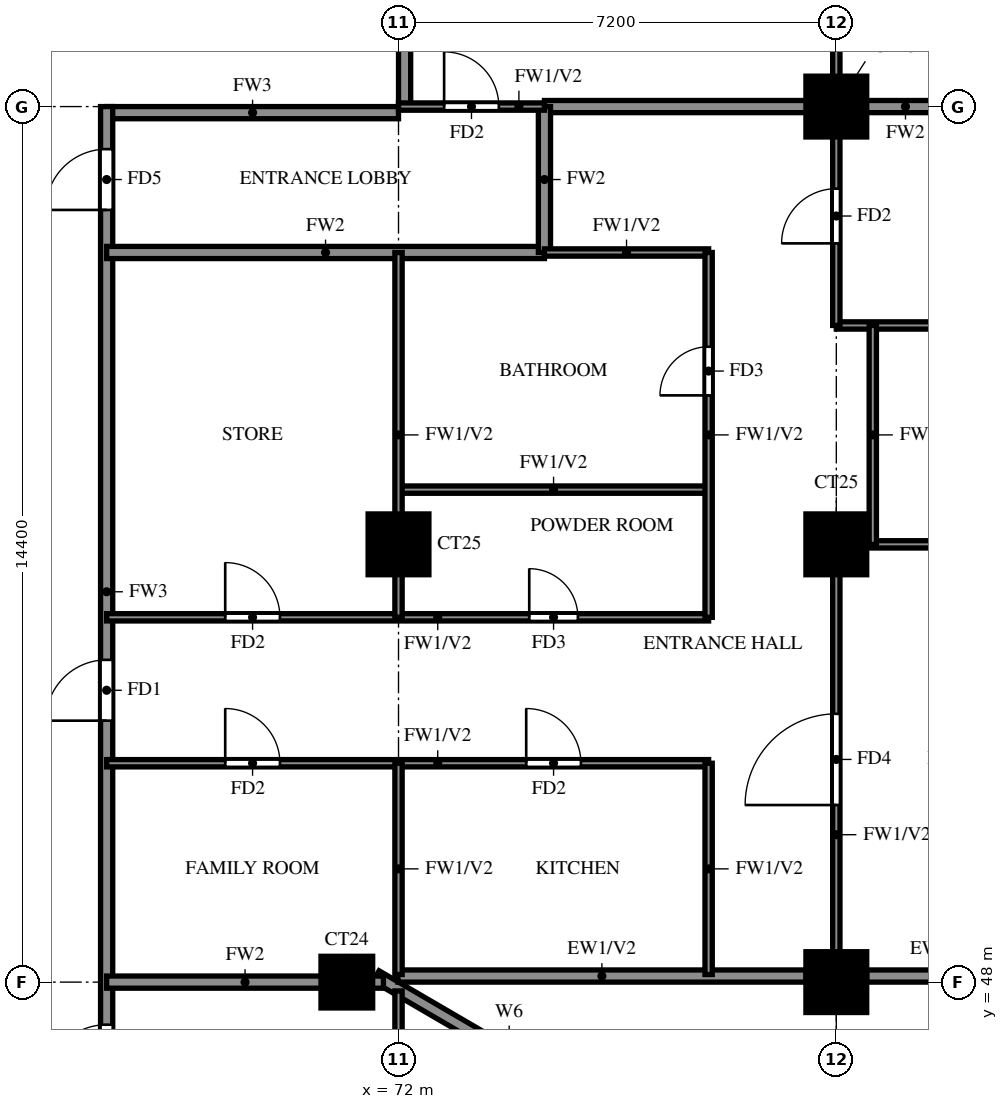
"""IFC4 building model, lengths in metres.
Left out: names, types, materials, properties, quantities, classifications, styles, units other than length and angle.
Written with IfcOpenShell. Run it as: python <this file> out.ifc"""

import sys

from ifc_helpers import new_model, si_unit, direction, frame, frame_2d, origin, origin_2d, place, context, subcontext, project, spatial, rectangle, extrude, source, transform, mapped, element, fill, save


model = new_model("IFC4")
c1 = context("Model", 3, precision=1e-05, world=origin(), true_north=direction((0.0, 1.0)))
c2 = subcontext(c1, "Body", "Model", "MODEL_VIEW")
j1 = project(units=[si_unit("LENGTHUNIT", "METRE"), si_unit("PLANEANGLEUNIT", "RADIAN")], contexts=[c1])
p1 = place(None, origin())
s1 = spatial("IfcSite", under=j1, at=p1, CompositionType="ELEMENT")
p2 = place(p1, origin())
s2 = spatial("IfcBuilding", under=s1, at=p2, CompositionType="ELEMENT")
p3 = place(p2, frame((0.0, 0.0, 164.0)))
s3 = spatial("IfcBuildingStorey", under=s2, at=p3, CompositionType="ELEMENT", Elevation=164.0)
m1 = source(origin(), c2, "Body", "SweptSolid", [
    extrude(rectangle(XDim=0.85, YDim=0.85, at=origin_2d()), origin(), (0.0, 0.0, 1.0), 3.2),
])
p4 = place(p3, frame((71.15, 48.0, 0.0), z_axis=(0.0, 0.0, 1.0), x_axis=(1.0, 0.0, 0.0)))
e1 = element("IfcColumn", 1, at=p4, inside=s3, PredefinedType="COLUMN", context=c2, shape_type="MappedRepresentation", body=[
    mapped(m1, transform((0.0, 0.0, 0.0))),
])
m2 = source(origin(), c2, "Body", "SweptSolid", [
    extrude(rectangle(XDim=1.0, YDim=1.0, at=origin_2d()), origin(), (0.0, 0.0, 1.0), 3.2),
])
for number, where, z_axis, x_axis in (
    (2, (79.2, 48.0, 0.0), (0.0, 0.0, 1.0), (1.0, 0.0, 0.0)),
    (3, (72.0, 55.2, 0.0), (0.0, 0.0, 1.0), (1.0, 0.0, 0.0)),
    (4, (79.2, 55.2, 0.0), (0.0, 0.0, 1.0), (1.0, 0.0, 0.0)),
    (5, (79.2, 62.4, 0.0), (0.0, 0.0, 1.0), (1.0, 0.0, 0.0)),
):
    element("IfcColumn", number, at=place(p3, frame(where, z_axis=z_axis, x_axis=x_axis)), inside=s3, PredefinedType="COLUMN", context=c2, shape_type="MappedRepresentation", body=[
        mapped(m2, transform((0.0, 0.0, 0.0))),
    ])
p5 = place(p3, frame((85.719, 39.881, 0.0), z_axis=(0.0, 0.0, 1.0), x_axis=(-0.86377618652, 0.503875678716, 0.0)))
e6 = element("IfcWall", 6, at=p5, inside=s3, PredefinedType="SOLIDWALL", context=c2, shape_type="SweptSolid", body=[
    extrude(rectangle(XDim=16.311, YDim=0.2, at=frame_2d((8.156, 0.0))), origin(), (0.0, 0.0, 1.0), 3.2),
])
p6 = place(p5, frame((13.326, 0.0, 1.5)))
e7 = element("IfcOpeningElement", 7, at=p6, cuts=e6, PredefinedType="OPENING", context=c2, shape_type="SweptSolid", body=[
    extrude(rectangle(XDim=0.9, YDim=0.9, at=frame_2d((0.45, 0.45))), frame((0.0, 0.11, 0.0), z_axis=(0.0, -1.0, 0.0), x_axis=(1.0, 0.0, 0.0)), (0.0, 0.0, 1.0), 0.22),
])
p7 = place(p3, frame((71.99, 48.1, 0.0), z_axis=(0.0, 0.0, 1.0), x_axis=(1.0, 0.0, 0.0)))
e8 = element("IfcWall", 8, at=p7, inside=s3, PredefinedType="SOLIDWALL", context=c2, shape_type="SweptSolid", body=[
    extrude(rectangle(XDim=6.71, YDim=0.2, at=frame_2d((3.355, 0.0))), origin(), (0.0, 0.0, 1.0), 3.2),
])
p8 = place(p3, frame((79.7, 48.1, 0.0), z_axis=(0.0, 0.0, 1.0), x_axis=(1.0, 0.0, 0.0)))
e9 = element("IfcWall", 9, at=p8, inside=s3, PredefinedType="SOLIDWALL", context=c2, shape_type="SweptSolid", body=[
    extrude(rectangle(XDim=5.675, YDim=0.2, at=frame_2d((2.837, 0.0))), origin(), (0.0, 0.0, 1.0), 3.2),
])
p9 = place(p8, frame((1.637, 0.0, 0.6)))
e10 = element("IfcOpeningElement", 10, at=p9, cuts=e9, PredefinedType="OPENING", context=c2, shape_type="SweptSolid", body=[
    extrude(rectangle(XDim=2.4, YDim=2.4, at=frame_2d((1.2, 1.2))), frame((0.0, 0.11, 0.0), z_axis=(0.0, -1.0, 0.0), x_axis=(1.0, 0.0, 0.0)), (0.0, 0.0, 1.0), 0.22),
])
p10 = place(p3, frame((67.2, 62.3, 0.0), z_axis=(0.0, 0.0, 1.0), x_axis=(1.0, 0.0, 0.0)))
e11 = element("IfcWall", 11, at=p10, inside=s3, PredefinedType="SOLIDWALL", context=c2, shape_type="SweptSolid", body=[
    extrude(rectangle(XDim=4.8, YDim=0.2, at=frame_2d((2.4, 0.0))), origin(), (0.0, 0.0, 1.0), 3.2),
])
p11 = place(p3, frame((67.2, 45.6, 0.0), z_axis=(0.0, 0.0, 1.0), x_axis=(0.0, 1.0, 0.0)))
e12 = element("IfcWall", 12, at=p11, inside=s3, PredefinedType="SOLIDWALL", context=c2, shape_type="SweptSolid", body=[
    extrude(rectangle(XDim=16.8, YDim=0.2, at=frame_2d((8.4, 0.0))), origin(), (0.0, 0.0, 1.0), 3.2),
])
p12 = place(p11, frame((6.7, 0.0, 0.0)))
e13 = element("IfcOpeningElement", 13, at=p12, cuts=e12, PredefinedType="OPENING", context=c2, shape_type="SweptSolid", body=[
    extrude(rectangle(XDim=1.0, YDim=2.1, at=frame_2d((0.5, 1.05))), frame((0.0, 0.11, 0.0), z_axis=(0.0, -1.0, 0.0), x_axis=(1.0, 0.0, 0.0)), (0.0, 0.0, 1.0), 0.22),
])
p13 = place(p11, frame((15.1, 0.0, 0.0)))
e14 = element("IfcOpeningElement", 14, at=p13, cuts=e12, PredefinedType="OPENING", context=c2, shape_type="SweptSolid", body=[
    extrude(rectangle(XDim=1.0, YDim=2.1, at=frame_2d((0.5, 1.05))), frame((0.0, 0.11, 0.0), z_axis=(0.0, -1.0, 0.0), x_axis=(1.0, 0.0, 0.0)), (0.0, 0.0, 1.0), 0.22),
])
p14 = place(p11, frame((0.7, 0.0, 0.0)))
e15 = element("IfcOpeningElement", 15, at=p14, cuts=e12, PredefinedType="OPENING", context=c2, shape_type="SweptSolid", body=[
    extrude(rectangle(XDim=1.0, YDim=2.1, at=frame_2d((0.5, 1.05))), frame((0.0, 0.11, 0.0), z_axis=(0.0, -1.0, 0.0), x_axis=(1.0, 0.0, 0.0)), (0.0, 0.0, 1.0), 0.22),
])
p15 = place(p3, frame((72.1, 62.4, 0.0), z_axis=(0.0, 0.0, 1.0), x_axis=(0.0, 1.0, 0.0)))
e16 = element("IfcWall", 16, at=p15, inside=s3, PredefinedType="SOLIDWALL", context=c2, shape_type="SweptSolid", body=[
    extrude(rectangle(XDim=15.6, YDim=0.2, at=frame_2d((7.8, 0.0))), origin(), (0.0, 0.0, 1.0), 3.2),
])
p16 = place(p3, frame((67.2, 48.0, 0.0), z_axis=(0.0, 0.0, 1.0), x_axis=(1.0, 0.0, 0.0)))
e17 = element("IfcWall", 17, at=p16, inside=s3, PredefinedType="SOLIDWALL", context=c2, shape_type="SweptSolid", body=[
    extrude(rectangle(XDim=4.552, YDim=0.2, at=frame_2d((2.276, 0.0))), origin(), (0.0, 0.0, 1.0), 3.2),
])
p17 = place(p3, frame((67.2, 60.0, 0.0), z_axis=(0.0, 0.0, 1.0), x_axis=(1.0, 0.0, 0.0)))
e18 = element("IfcWall", 18, at=p17, inside=s3, PredefinedType="SOLIDWALL", context=c2, shape_type="SweptSolid", body=[
    extrude(rectangle(XDim=7.2, YDim=0.2, at=frame_2d((3.6, 0.0))), origin(), (0.0, 0.0, 1.0), 3.2),
])
p18 = place(p3, frame((74.4, 62.4, 0.0), z_axis=(0.0, 0.0, 1.0), x_axis=(1.0, 0.0, 0.0)))
e19 = element("IfcWall", 19, at=p18, inside=s3, PredefinedType="SOLIDWALL", context=c2, shape_type="SweptSolid", body=[
    extrude(rectangle(XDim=11.875, YDim=0.2, at=frame_2d((5.938, 0.0))), origin(), (0.0, 0.0, 1.0), 3.2),
])
p19 = place(p3, frame((74.4, 60.0, 0.0), z_axis=(0.0, 0.0, 1.0), x_axis=(0.0, 1.0, 0.0)))
e20 = element("IfcWall", 20, at=p19, inside=s3, PredefinedType="SOLIDWALL", context=c2, shape_type="SweptSolid", body=[
    extrude(rectangle(XDim=2.4, YDim=0.2, at=frame_2d((1.2, 0.0))), origin(), (0.0, 0.0, 1.0), 3.2),
])
p20 = place(p3, frame((67.2, 51.6, 0.0), z_axis=(0.0, 0.0, 1.0), x_axis=(1.0, 0.0, 0.0)))
e21 = element("IfcWall", 21, at=p20, inside=s3, PredefinedType="PARTITIONING", context=c2, shape_type="SweptSolid", body=[
    extrude(rectangle(XDim=9.9, YDim=0.12, at=frame_2d((4.95, 0.0))), origin(), (0.0, 0.0, 1.0), 3.2),
])
p21 = place(p20, frame((6.9, 0.0, 0.0)))
e22 = element("IfcOpeningElement", 22, at=p21, cuts=e21, PredefinedType="OPENING", context=c2, shape_type="SweptSolid", body=[
    extrude(rectangle(XDim=0.9, YDim=2.1, at=frame_2d((0.45, 1.05))), frame((0.0, 0.07, 0.0), z_axis=(0.0, -1.0, 0.0), x_axis=(1.0, 0.0, 0.0)), (0.0, 0.0, 1.0), 0.14),
])
p22 = place(p20, frame((1.95, 0.0, 0.0)))
e23 = element("IfcOpeningElement", 23, at=p22, cuts=e21, PredefinedType="OPENING", context=c2, shape_type="SweptSolid", body=[
    extrude(rectangle(XDim=0.9, YDim=2.1, at=frame_2d((0.45, 1.05))), frame((0.0, 0.07, 0.0), z_axis=(0.0, -1.0, 0.0), x_axis=(1.0, 0.0, 0.0)), (0.0, 0.0, 1.0), 0.14),
])
p23 = place(p3, frame((67.2, 54.0, 0.0), z_axis=(0.0, 0.0, 1.0), x_axis=(1.0, 0.0, 0.0)))
e24 = element("IfcWall", 24, at=p23, inside=s3, PredefinedType="PARTITIONING", context=c2, shape_type="SweptSolid", body=[
    extrude(rectangle(XDim=9.9, YDim=0.12, at=frame_2d((4.95, 0.0))), origin(), (0.0, 0.0, 1.0), 3.2),
])
p24 = place(p23, frame((6.95, 0.0, 0.0)))
e25 = element("IfcOpeningElement", 25, at=p24, cuts=e24, PredefinedType="OPENING", context=c2, shape_type="SweptSolid", body=[
    extrude(rectangle(XDim=0.8, YDim=2.1, at=frame_2d((0.4, 1.05))), frame((0.0, 0.07, 0.0), z_axis=(0.0, -1.0, 0.0), x_axis=(1.0, 0.0, 0.0)), (0.0, 0.0, 1.0), 0.14),
])
p25 = place(p23, frame((1.95, 0.0, 0.0)))
e26 = element("IfcOpeningElement", 26, at=p25, cuts=e24, PredefinedType="OPENING", context=c2, shape_type="SweptSolid", body=[
    extrude(rectangle(XDim=0.9, YDim=2.1, at=frame_2d((0.45, 1.05))), frame((0.0, 0.07, 0.0), z_axis=(0.0, -1.0, 0.0), x_axis=(1.0, 0.0, 0.0)), (0.0, 0.0, 1.0), 0.14),
])
p26 = place(p3, frame((79.2, 55.2, 0.0), z_axis=(0.0, 0.0, 1.0), x_axis=(1.0, 0.0, 0.0)))
e27 = element("IfcWall", 27, at=p26, inside=s3, PredefinedType="PARTITIONING", context=c2, shape_type="SweptSolid", body=[
    extrude(rectangle(XDim=7.075, YDim=0.12, at=frame_2d((3.538, 0.0))), origin(), (0.0, 0.0, 1.0), 3.2),
])
p27 = place(p3, frame((72.0, 56.1, 0.0), z_axis=(0.0, 0.0, 1.0), x_axis=(1.0, 0.0, 0.0)))
e28 = element("IfcWall", 28, at=p27, inside=s3, PredefinedType="PARTITIONING", context=c2, shape_type="SweptSolid", body=[
    extrude(rectangle(XDim=5.1, YDim=0.12, at=frame_2d((2.55, 0.0))), origin(), (0.0, 0.0, 1.0), 3.2),
])
p28 = place(p3, frame((79.2, 58.8, 0.0), z_axis=(0.0, 0.0, 1.0), x_axis=(1.0, 0.0, 0.0)))
e29 = element("IfcWall", 29, at=p28, inside=s3, PredefinedType="PARTITIONING", context=c2, shape_type="SweptSolid", body=[
    extrude(rectangle(XDim=7.075, YDim=0.12, at=frame_2d((3.538, 0.0))), origin(), (0.0, 0.0, 1.0), 2.3),
])
p29 = place(p28, frame((3.438, 0.0, 0.0)))
e30 = element("IfcOpeningElement", 30, at=p29, cuts=e29, PredefinedType="OPENING", context=c2, shape_type="SweptSolid", body=[
    extrude(rectangle(XDim=0.8, YDim=2.1, at=frame_2d((0.4, 1.05))), frame((0.0, 0.07, 0.0), z_axis=(0.0, -1.0, 0.0), x_axis=(1.0, 0.0, 0.0)), (0.0, 0.0, 1.0), 0.14),
])
p30 = place(p3, frame((74.4, 60.0, 0.0), z_axis=(0.0, 0.0, 1.0), x_axis=(1.0, 0.0, 0.0)))
e31 = element("IfcWall", 31, at=p30, inside=s3, PredefinedType="PARTITIONING", context=c2, shape_type="SweptSolid", body=[
    extrude(rectangle(XDim=2.7, YDim=0.12, at=frame_2d((1.35, 0.0))), origin(), (0.0, 0.0, 1.0), 3.2),
])
p31 = place(p3, frame((72.0, 62.4, 0.0), z_axis=(0.0, 0.0, 1.0), x_axis=(1.0, 0.0, 0.0)))
e32 = element("IfcWall", 32, at=p31, inside=s3, PredefinedType="PARTITIONING", context=c2, shape_type="SweptSolid", body=[
    extrude(rectangle(XDim=2.4, YDim=0.12, at=frame_2d((1.2, 0.0))), origin(), (0.0, 0.0, 1.0), 3.2),
])
p32 = place(p31, frame((0.75, 0.0, 0.0)))
e33 = element("IfcOpeningElement", 33, at=p32, cuts=e32, PredefinedType="OPENING", context=c2, shape_type="SweptSolid", body=[
    extrude(rectangle(XDim=0.9, YDim=2.1, at=frame_2d((0.45, 1.05))), frame((0.0, 0.07, 0.0), z_axis=(0.0, -1.0, 0.0), x_axis=(1.0, 0.0, 0.0)), (0.0, 0.0, 1.0), 0.14),
])
p33 = place(p3, frame((72.0, 39.725, 0.0), z_axis=(0.0, 0.0, 1.0), x_axis=(0.0, 1.0, 0.0)))
e34 = element("IfcWall", 34, at=p33, inside=s3, PredefinedType="PARTITIONING", context=c2, shape_type="SweptSolid", body=[
    extrude(rectangle(XDim=8.13, YDim=0.12, at=frame_2d((4.065, 0.0))), origin(), (0.0, 0.0, 1.0), 2.3),
])
p34 = place(p33, frame((1.788, 0.0, 0.0)))
e35 = element("IfcOpeningElement", 35, at=p34, cuts=e34, PredefinedType="OPENING", context=c2, shape_type="SweptSolid", body=[
    extrude(rectangle(XDim=0.9, YDim=2.1, at=frame_2d((0.45, 1.05))), frame((0.0, 0.07, 0.0), z_axis=(0.0, -1.0, 0.0), x_axis=(1.0, 0.0, 0.0)), (0.0, 0.0, 1.0), 0.14),
])
p35 = place(p33, frame((4.575, 0.0, 0.0)))
e36 = element("IfcOpeningElement", 36, at=p35, cuts=e34, PredefinedType="OPENING", context=c2, shape_type="SweptSolid", body=[
    extrude(rectangle(XDim=0.8, YDim=2.1, at=frame_2d((0.4, 1.05))), frame((0.0, 0.07, 0.0), z_axis=(0.0, -1.0, 0.0), x_axis=(1.0, 0.0, 0.0)), (0.0, 0.0, 1.0), 0.14),
])
p36 = place(p3, frame((72.0, 48.125, 0.0), z_axis=(0.0, 0.0, 1.0), x_axis=(0.0, 1.0, 0.0)))
e37 = element("IfcWall", 37, at=p36, inside=s3, PredefinedType="PARTITIONING", context=c2, shape_type="SweptSolid", body=[
    extrude(rectangle(XDim=3.475, YDim=0.12, at=frame_2d((1.738, 0.0))), origin(), (0.0, 0.0, 1.0), 3.2),
])
p37 = place(p3, frame((72.0, 54.0, 0.0), z_axis=(0.0, 0.0, 1.0), x_axis=(0.0, 1.0, 0.0)))
e38 = element("IfcWall", 38, at=p37, inside=s3, PredefinedType="PARTITIONING", context=c2, shape_type="SweptSolid", body=[
    extrude(rectangle(XDim=6.0, YDim=0.12, at=frame_2d((3.0, 0.0))), origin(), (0.0, 0.0, 1.0), 3.2),
])
p38 = place(p3, frame((77.1, 48.125, 0.0), z_axis=(0.0, 0.0, 1.0), x_axis=(0.0, 1.0, 0.0)))
e39 = element("IfcWall", 39, at=p38, inside=s3, PredefinedType="PARTITIONING", context=c2, shape_type="SweptSolid", body=[
    extrude(rectangle(XDim=3.475, YDim=0.12, at=frame_2d((1.738, 0.0))), origin(), (0.0, 0.0, 1.0), 3.2),
])
p39 = place(p3, frame((77.1, 54.0, 0.0), z_axis=(0.0, 0.0, 1.0), x_axis=(0.0, 1.0, 0.0)))
e40 = element("IfcWall", 40, at=p39, inside=s3, PredefinedType="PARTITIONING", context=c2, shape_type="SweptSolid", body=[
    extrude(rectangle(XDim=6.0, YDim=0.12, at=frame_2d((3.0, 0.0))), origin(), (0.0, 0.0, 1.0), 3.2),
])
p40 = place(p39, frame((3.65, 0.0, 0.0)))
e41 = element("IfcOpeningElement", 41, at=p40, cuts=e40, PredefinedType="OPENING", context=c2, shape_type="SweptSolid", body=[
    extrude(rectangle(XDim=0.8, YDim=2.1, at=frame_2d((0.4, 1.05))), frame((0.0, 0.07, 0.0), z_axis=(0.0, -1.0, 0.0), x_axis=(1.0, 0.0, 0.0)), (0.0, 0.0, 1.0), 0.14),
])
p41 = place(p3, frame((79.2, 48.125, 0.0), z_axis=(0.0, 0.0, 1.0), x_axis=(0.0, 1.0, 0.0)))
e42 = element("IfcWall", 42, at=p41, inside=s3, PredefinedType="PARTITIONING", context=c2, shape_type="SweptSolid", body=[
    extrude(rectangle(XDim=7.075, YDim=0.12, at=frame_2d((3.538, 0.0))), origin(), (0.0, 0.0, 1.0), 3.2),
])
p42 = place(p41, frame((2.788, 0.0, 0.0)))
e43 = element("IfcOpeningElement", 43, at=p42, cuts=e42, PredefinedType="OPENING", context=c2, shape_type="SweptSolid", body=[
    extrude(rectangle(XDim=1.5, YDim=2.1, at=frame_2d((0.75, 1.05))), frame((0.0, 0.07, 0.0), z_axis=(0.0, -1.0, 0.0), x_axis=(1.0, 0.0, 0.0)), (0.0, 0.0, 1.0), 0.14),
])
p43 = place(p3, frame((79.2, 58.8, 0.0), z_axis=(0.0, 0.0, 1.0), x_axis=(0.0, 1.0, 0.0)))
e44 = element("IfcWall", 44, at=p43, inside=s3, PredefinedType="PARTITIONING", context=c2, shape_type="SweptSolid", body=[
    extrude(rectangle(XDim=10.8, YDim=0.12, at=frame_2d((5.4, 0.0))), origin(), (0.0, 0.0, 1.0), 3.2),
])
p44 = place(p43, frame((1.35, 0.0, 0.0)))
e45 = element("IfcOpeningElement", 45, at=p44, cuts=e44, PredefinedType="OPENING", context=c2, shape_type="SweptSolid", body=[
    extrude(rectangle(XDim=0.9, YDim=2.1, at=frame_2d((0.45, 1.05))), frame((0.0, 0.07, 0.0), z_axis=(0.0, -1.0, 0.0), x_axis=(1.0, 0.0, 0.0)), (0.0, 0.0, 1.0), 0.14),
])
p45 = place(p43, frame((4.95, 0.0, 0.0)))
e46 = element("IfcOpeningElement", 46, at=p45, cuts=e44, PredefinedType="OPENING", context=c2, shape_type="SweptSolid", body=[
    extrude(rectangle(XDim=0.9, YDim=2.1, at=frame_2d((0.45, 1.05))), frame((0.0, 0.07, 0.0), z_axis=(0.0, -1.0, 0.0), x_axis=(1.0, 0.0, 0.0)), (0.0, 0.0, 1.0), 0.14),
])
p46 = place(p43, frame((8.55, 0.0, 0.0)))
e47 = element("IfcOpeningElement", 47, at=p46, cuts=e44, PredefinedType="OPENING", context=c2, shape_type="SweptSolid", body=[
    extrude(rectangle(XDim=0.9, YDim=2.1, at=frame_2d((0.45, 1.05))), frame((0.0, 0.07, 0.0), z_axis=(0.0, -1.0, 0.0), x_axis=(1.0, 0.0, 0.0)), (0.0, 0.0, 1.0), 0.14),
])
p47 = place(p3, frame((79.8, 55.2, 0.0), z_axis=(0.0, 0.0, 1.0), x_axis=(0.0, 1.0, 0.0)))
e48 = element("IfcWall", 48, at=p47, inside=s3, PredefinedType="PARTITIONING", context=c2, shape_type="SweptSolid", body=[
    extrude(rectangle(XDim=3.6, YDim=0.12, at=frame_2d((1.8, 0.0))), origin(), (0.0, 0.0, 1.0), 3.2),
])
p48 = place(p12, origin())
e49 = element("IfcDoor", 49, at=p48, inside=s3, OperationType="SINGLE_SWING_LEFT", PredefinedType="DOOR", context=c2, shape_type="SweptSolid", body=[
    extrude(rectangle(XDim=1.0, YDim=2.1, at=frame_2d((0.5, 1.05))), frame((0.0, 0.025, 0.0), z_axis=(0.0, -1.0, 0.0), x_axis=(1.0, 0.0, 0.0)), (0.0, 0.0, 1.0), 0.05),
])
fill(e13, e49)
p49 = place(p42, origin())
e50 = element("IfcDoor", 50, at=p49, inside=s3, OperationType="SINGLE_SWING_LEFT", PredefinedType="DOOR", context=c2, shape_type="SweptSolid", body=[
    extrude(rectangle(XDim=1.5, YDim=2.1, at=frame_2d((0.75, 1.05))), frame((0.0, 0.025, 0.0), z_axis=(0.0, -1.0, 0.0), x_axis=(1.0, 0.0, 0.0)), (0.0, 0.0, 1.0), 0.05),
])
fill(e43, e50)
p50 = place(p44, origin())
e51 = element("IfcDoor", 51, at=p50, inside=s3, OperationType="SINGLE_SWING_RIGHT", PredefinedType="DOOR", context=c2, shape_type="SweptSolid", body=[
    extrude(rectangle(XDim=0.9, YDim=2.1, at=frame_2d((0.45, 1.05))), frame((0.0, 0.025, 0.0), z_axis=(0.0, -1.0, 0.0), x_axis=(1.0, 0.0, 0.0)), (0.0, 0.0, 1.0), 0.05),
])
fill(e45, e51)
p51 = place(p21, origin())
e52 = element("IfcDoor", 52, at=p51, inside=s3, OperationType="SINGLE_SWING_LEFT", PredefinedType="DOOR", context=c2, shape_type="SweptSolid", body=[
    extrude(rectangle(XDim=0.9, YDim=2.1, at=frame_2d((0.45, 1.05))), frame((0.0, 0.025, 0.0), z_axis=(0.0, -1.0, 0.0), x_axis=(1.0, 0.0, 0.0)), (0.0, 0.0, 1.0), 0.05),
])
fill(e22, e52)
p52 = place(p24, origin())
e53 = element("IfcDoor", 53, at=p52, inside=s3, OperationType="SINGLE_SWING_RIGHT", PredefinedType="DOOR", context=c2, shape_type="SweptSolid", body=[
    extrude(rectangle(XDim=0.8, YDim=2.1, at=frame_2d((0.4, 1.05))), frame((0.0, 0.025, 0.0), z_axis=(0.0, -1.0, 0.0), x_axis=(1.0, 0.0, 0.0)), (0.0, 0.0, 1.0), 0.05),
])
fill(e25, e53)
p53 = place(p40, origin())
e54 = element("IfcDoor", 54, at=p53, inside=s3, OperationType="SINGLE_SWING_LEFT", PredefinedType="DOOR", context=c2, shape_type="SweptSolid", body=[
    extrude(rectangle(XDim=0.8, YDim=2.1, at=frame_2d((0.4, 1.05))), frame((0.0, 0.025, 0.0), z_axis=(0.0, -1.0, 0.0), x_axis=(1.0, 0.0, 0.0)), (0.0, 0.0, 1.0), 0.05),
])
fill(e41, e54)
p54 = place(p22, origin())
e55 = element("IfcDoor", 55, at=p54, inside=s3, OperationType="SINGLE_SWING_LEFT", PredefinedType="DOOR", context=c2, shape_type="SweptSolid", body=[
    extrude(rectangle(XDim=0.9, YDim=2.1, at=frame_2d((0.45, 1.05))), frame((0.0, 0.025, 0.0), z_axis=(0.0, -1.0, 0.0), x_axis=(1.0, 0.0, 0.0)), (0.0, 0.0, 1.0), 0.05),
])
fill(e23, e55)
p55 = place(p25, origin())
e56 = element("IfcDoor", 56, at=p55, inside=s3, OperationType="SINGLE_SWING_RIGHT", PredefinedType="DOOR", context=c2, shape_type="SweptSolid", body=[
    extrude(rectangle(XDim=0.9, YDim=2.1, at=frame_2d((0.45, 1.05))), frame((0.0, 0.025, 0.0), z_axis=(0.0, -1.0, 0.0), x_axis=(1.0, 0.0, 0.0)), (0.0, 0.0, 1.0), 0.05),
])
fill(e26, e56)
p56 = place(p32, origin())
e57 = element("IfcDoor", 57, at=p56, inside=s3, OperationType="SINGLE_SWING_RIGHT", PredefinedType="DOOR", context=c2, shape_type="SweptSolid", body=[
    extrude(rectangle(XDim=0.9, YDim=2.1, at=frame_2d((0.45, 1.05))), frame((0.0, 0.025, 0.0), z_axis=(0.0, -1.0, 0.0), x_axis=(1.0, 0.0, 0.0)), (0.0, 0.0, 1.0), 0.05),
])
fill(e33, e57)
p57 = place(p13, origin())
e58 = element("IfcDoor", 58, at=p57, inside=s3, OperationType="SINGLE_SWING_LEFT", PredefinedType="DOOR", context=c2, shape_type="SweptSolid", body=[
    extrude(rectangle(XDim=1.0, YDim=2.1, at=frame_2d((0.5, 1.05))), frame((0.0, 0.025, 0.0), z_axis=(0.0, -1.0, 0.0), x_axis=(1.0, 0.0, 0.0)), (0.0, 0.0, 1.0), 0.05),
])
fill(e14, e58)
p58 = place(p14, origin())
e59 = element("IfcDoor", 59, at=p58, inside=s3, OperationType="SINGLE_SWING_LEFT", PredefinedType="DOOR", context=c2, shape_type="SweptSolid", body=[
    extrude(rectangle(XDim=1.0, YDim=2.1, at=frame_2d((0.5, 1.05))), frame((0.0, 0.025, 0.0), z_axis=(0.0, -1.0, 0.0), x_axis=(1.0, 0.0, 0.0)), (0.0, 0.0, 1.0), 0.05),
])
fill(e15, e59)
save(model, sys.argv[1])
